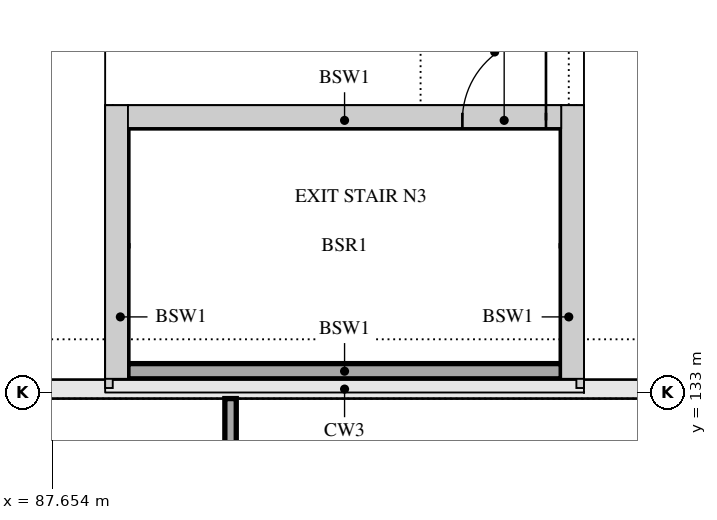
"""IFC4 building model, lengths in metres.
Left out: names, types, materials, properties, quantities, classifications, styles, units other than length and angle.
Written with IfcOpenShell. Run it as: python <this file> out.ifc"""

import sys

from ifc_helpers import new_model, si_unit, direction, frame, frame_2d, origin, place, context, subcontext, project, spatial, rectangle, extrude, element, fill, save


model = new_model("IFC4")
c1 = context("Model", 3, precision=1e-05, world=origin(), true_north=direction((0.0, 1.0)))
c2 = subcontext(c1, "Body", "Model", "MODEL_VIEW")
j1 = project(units=[si_unit("LENGTHUNIT", "METRE"), si_unit("PLANEANGLEUNIT", "RADIAN")], contexts=[c1])
p1 = place(None, origin())
s1 = spatial("IfcSite", under=j1, at=p1, CompositionType="ELEMENT")
p2 = place(p1, origin())
s2 = spatial("IfcBuilding", under=s1, at=p2, CompositionType="ELEMENT")
p3 = place(p2, origin())
s3 = spatial("IfcBuildingStorey", under=s2, at=p3, CompositionType="ELEMENT", Elevation=0.0)
p4 = place(p3, frame((94.45, 133.059, 0.0), z_axis=(0.0, 0.0, 1.0), x_axis=(0.0, 1.0, 0.0)))
e1 = element("IfcWall", 1, at=p4, inside=s3, PredefinedType="SOLIDWALL", context=c2, shape_type="SweptSolid", body=[
    extrude(rectangle(XDim=1.871, YDim=0.2, at=frame_2d((0.936, 0.0))), origin(), (0.0, 0.0, 1.0), 3.2),
])
p5 = place(p3, frame((94.45, 134.93, 0.0), z_axis=(0.0, 0.0, 1.0), x_axis=(0.0, 1.0, 0.0)))
e2 = element("IfcWall", 2, at=p5, inside=s3, PredefinedType="SOLIDWALL", context=c2, shape_type="SweptSolid", body=[
    extrude(rectangle(XDim=1.75, YDim=0.2, at=frame_2d((0.875, 0.0))), origin(), (0.0, 0.0, 1.0), 3.2),
])
p6 = place(p3, frame((88.55, 133.059, 0.0), z_axis=(0.0, 0.0, 1.0), x_axis=(0.0, 1.0, 0.0)))
e3 = element("IfcWall", 3, at=p6, inside=s3, PredefinedType="SOLIDWALL", context=c2, shape_type="SweptSolid", body=[
    extrude(rectangle(XDim=1.871, YDim=0.2, at=frame_2d((0.936, 0.0))), origin(), (0.0, 0.0, 1.0), 3.2),
])
p7 = place(p3, frame((88.55, 134.93, 0.0), z_axis=(0.0, 0.0, 1.0), x_axis=(0.0, 1.0, 0.0)))
e4 = element("IfcWall", 4, at=p7, inside=s3, PredefinedType="SOLIDWALL", context=c2, shape_type="SweptSolid", body=[
    extrude(rectangle(XDim=1.75, YDim=0.2, at=frame_2d((0.875, 0.0))), origin(), (0.0, 0.0, 1.0), 3.2),
])
p8 = place(p3, frame((94.35, 136.58, 0.0), z_axis=(0.0, 0.0, 1.0), x_axis=(-1.0, 0.0, 0.0)))
e5 = element("IfcWall", 5, at=p8, inside=s3, PredefinedType="SOLIDWALL", context=c2, shape_type="SweptSolid", body=[
    extrude(rectangle(XDim=5.7, YDim=0.2, at=frame_2d((2.85, 0.0))), origin(), (0.0, 0.0, 1.0), 3.2),
])
p9 = place(p8, frame((0.2, 0.0, 0.0)))
e6 = element("IfcOpeningElement", 6, at=p9, cuts=e5, PredefinedType="OPENING", context=c2, shape_type="SweptSolid", body=[
    extrude(rectangle(XDim=1.1, YDim=2.1, at=frame_2d((0.55, 1.05))), frame((0.0, 0.11, 0.0), z_axis=(0.0, -1.0, 0.0), x_axis=(1.0, 0.0, 0.0)), (0.0, 0.0, 1.0), 0.22),
])
p10 = place(p3, frame((94.35, 133.28, 0.0), z_axis=(0.0, 0.0, 1.0), x_axis=(-1.0, 0.0, 0.0)))
e7 = element("IfcWall", 7, at=p10, inside=s3, PredefinedType="SOLIDWALL", context=c2, shape_type="SweptSolid", body=[
    extrude(rectangle(XDim=5.7, YDim=0.2, at=frame_2d((2.85, 0.0))), origin(), (0.0, 0.0, 1.0), 3.2),
])
p11 = place(p3, frame((90.0, 125.925, 0.0), z_axis=(0.0, 0.0, 1.0), x_axis=(0.0, 1.0, 0.0)))
e8 = element("IfcWall", 8, at=p11, inside=s3, PredefinedType="PARTITIONING", context=c2, shape_type="SweptSolid", body=[
    extrude(rectangle(XDim=6.995, YDim=0.15, at=frame_2d((3.498, 0.0))), origin(), (0.0, 0.0, 1.0), 4.8),
])
p12 = place(p9, frame((1.1, 0.0, 0.0), z_axis=(0.0, 0.0, 1.0), x_axis=(-1.0, 0.0, 0.0)))
e9 = element("IfcDoor", 9, at=p12, inside=s3, OperationType="SINGLE_SWING_RIGHT", PredefinedType="DOOR", context=c2, shape_type="SweptSolid", body=[
    extrude(rectangle(XDim=1.1, YDim=2.1, at=frame_2d((0.55, 1.05))), frame((0.0, 0.025, 0.0), z_axis=(0.0, -1.0, 0.0), x_axis=(1.0, 0.0, 0.0)), (0.0, 0.0, 1.0), 0.05),
])
fill(e6, e9)
save(model, sys.argv[1])
